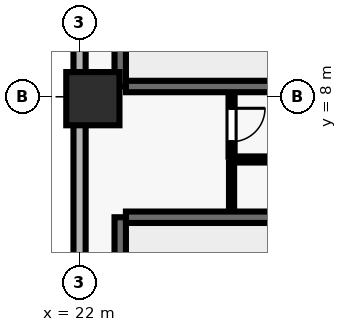
"""IFC4 building model, lengths in metres.
Left out: names, types, materials, properties, quantities, classifications, styles, units other than length and angle.
Written with IfcOpenShell. Run it as: python <this file> out.ifc"""

import sys

from ifc_helpers import new_model, si_unit, direction, frame, frame_2d, origin, origin_2d, place, context, subcontext, project, spatial, rectangle, extrude, element, fill, save


model = new_model("IFC4")
c1 = context("Model", 3, precision=1e-05, world=origin(), true_north=direction((0.0, 1.0)))
c2 = subcontext(c1, "Body", "Model", "MODEL_VIEW")
j1 = project(units=[si_unit("LENGTHUNIT", "METRE"), si_unit("PLANEANGLEUNIT", "RADIAN")], contexts=[c1])
p1 = place(None, origin())
s1 = spatial("IfcSite", under=j1, at=p1, CompositionType="ELEMENT")
p2 = place(p1, origin())
s2 = spatial("IfcBuilding", under=s1, at=p2, CompositionType="ELEMENT")
p3 = place(p2, frame((0.0, 0.0, 77.8)))
s3 = spatial("IfcBuildingStorey", under=s2, at=p3, CompositionType="ELEMENT", Elevation=77.8)
p4 = place(p3, frame((22.35, 7.95, 0.0), z_axis=(0.0, 0.0, 1.0), x_axis=(1.0, 0.0, 0.0)))
e1 = element("IfcColumn", 1, at=p4, inside=s3, PredefinedType="COLUMN", context=c2, shape_type="SweptSolid", body=[
    extrude(rectangle(XDim=1.4, YDim=1.4, at=origin_2d()), origin(), (0.0, 0.0, 1.0), 3.9),
])
p5 = place(p3, frame((22.0, 51.5, 0.0), z_axis=(0.0, 0.0, 1.0), x_axis=(0.0, -1.0, 0.0)))
e2 = element("IfcWall", 2, at=p5, inside=s3, PredefinedType="SOLIDWALL", context=c2, shape_type="SweptSolid", body=[
    extrude(rectangle(XDim=49.0, YDim=0.32, at=frame_2d((24.5, 0.0))), origin(), (0.0, 0.0, 1.0), 3.69),
])
p6 = place(p5, frame((12.1, 0.0, 0.0)))
e3 = element("IfcOpeningElement", 3, at=p6, cuts=e2, PredefinedType="OPENING", context=c2, shape_type="SweptSolid", body=[
    extrude(rectangle(XDim=1.0, YDim=2.2, at=frame_2d((0.5, 1.1))), frame((0.0, 0.17, 0.0), z_axis=(0.0, -1.0, 0.0), x_axis=(1.0, 0.0, 0.0)), (0.0, 0.0, 1.0), 0.34),
])
p7 = place(p5, frame((1.822, 0.0, 0.9)))
e4 = element("IfcOpeningElement", 4, at=p7, cuts=e2, PredefinedType="OPENING", context=c2, shape_type="SweptSolid", body=[
    extrude(rectangle(XDim=1.8, YDim=1.8, at=frame_2d((0.9, 0.9))), frame((0.0, 0.17, 0.0), z_axis=(0.0, -1.0, 0.0), x_axis=(1.0, 0.0, 0.0)), (0.0, 0.0, 1.0), 0.34),
])
p8 = place(p5, frame((7.267, 0.0, 0.9)))
e5 = element("IfcOpeningElement", 5, at=p8, cuts=e2, PredefinedType="OPENING", context=c2, shape_type="SweptSolid", body=[
    extrude(rectangle(XDim=1.8, YDim=1.8, at=frame_2d((0.9, 0.9))), frame((0.0, 0.17, 0.0), z_axis=(0.0, -1.0, 0.0), x_axis=(1.0, 0.0, 0.0)), (0.0, 0.0, 1.0), 0.34),
])
p9 = place(p5, frame((19.056, 0.0, 0.9)))
e6 = element("IfcOpeningElement", 6, at=p9, cuts=e2, PredefinedType="OPENING", context=c2, shape_type="SweptSolid", body=[
    extrude(rectangle(XDim=1.8, YDim=1.8, at=frame_2d((0.9, 0.9))), frame((0.0, 0.17, 0.0), z_axis=(0.0, -1.0, 0.0), x_axis=(1.0, 0.0, 0.0)), (0.0, 0.0, 1.0), 0.34),
])
p10 = place(p5, frame((23.15, 0.0, 0.9)))
e7 = element("IfcOpeningElement", 7, at=p10, cuts=e2, PredefinedType="OPENING", context=c2, shape_type="SweptSolid", body=[
    extrude(rectangle(XDim=1.8, YDim=1.8, at=frame_2d((0.9, 0.9))), frame((0.0, 0.17, 0.0), z_axis=(0.0, -1.0, 0.0), x_axis=(1.0, 0.0, 0.0)), (0.0, 0.0, 1.0), 0.34),
])
p11 = place(p5, frame((29.044, 0.0, 0.9)))
e8 = element("IfcOpeningElement", 8, at=p11, cuts=e2, PredefinedType="OPENING", context=c2, shape_type="SweptSolid", body=[
    extrude(rectangle(XDim=1.8, YDim=1.8, at=frame_2d((0.9, 0.9))), frame((0.0, 0.17, 0.0), z_axis=(0.0, -1.0, 0.0), x_axis=(1.0, 0.0, 0.0)), (0.0, 0.0, 1.0), 0.34),
])
p12 = place(p5, frame((34.039, 0.0, 0.9)))
e9 = element("IfcOpeningElement", 9, at=p12, cuts=e2, PredefinedType="OPENING", context=c2, shape_type="SweptSolid", body=[
    extrude(rectangle(XDim=1.8, YDim=1.8, at=frame_2d((0.9, 0.9))), frame((0.0, 0.17, 0.0), z_axis=(0.0, -1.0, 0.0), x_axis=(1.0, 0.0, 0.0)), (0.0, 0.0, 1.0), 0.34),
])
p13 = place(p5, frame((39.933, 0.0, 0.9)))
e10 = element("IfcOpeningElement", 10, at=p13, cuts=e2, PredefinedType="OPENING", context=c2, shape_type="SweptSolid", body=[
    extrude(rectangle(XDim=1.8, YDim=1.8, at=frame_2d((0.9, 0.9))), frame((0.0, 0.17, 0.0), z_axis=(0.0, -1.0, 0.0), x_axis=(1.0, 0.0, 0.0)), (0.0, 0.0, 1.0), 0.34),
])
p14 = place(p3, frame((31.58, 4.83, 0.0), z_axis=(0.0, 0.0, 1.0), x_axis=(-1.0, 0.0, 0.0)))
e11 = element("IfcWall", 11, at=p14, inside=s3, PredefinedType="SHEAR", context=c2, shape_type="SweptSolid", body=[
    extrude(rectangle(XDim=8.36, YDim=0.3, at=frame_2d((4.18, 0.0))), origin(), (0.0, 0.0, 1.0), 3.69),
])
for number, where, z_axis, x_axis in (
    (12, (23.07, 4.83, 0.0), (0.0, 0.0, 1.0), (0.0, -1.0, 0.0)),
    (13, (23.07, 11.78, 0.0), (0.0, 0.0, 1.0), (0.0, -1.0, 0.0)),
):
    element("IfcWall", number, at=place(p3, frame(where, z_axis=z_axis, x_axis=x_axis)), inside=s3, PredefinedType="SHEAR", context=c2, shape_type="SweptSolid", body=[
        extrude(rectangle(XDim=3.51, YDim=0.3, at=frame_2d((1.755, 0.0))), origin(), (0.0, 0.0, 1.0), 3.69),
    ])
p15 = place(p3, frame((23.22, 8.27, 0.0), z_axis=(0.0, 0.0, 1.0), x_axis=(1.0, 0.0, 0.0)))
e14 = element("IfcWall", 14, at=p15, inside=s3, PredefinedType="SHEAR", context=c2, shape_type="SweptSolid", body=[
    extrude(rectangle(XDim=8.36, YDim=0.3, at=frame_2d((4.18, 0.0))), origin(), (0.0, 0.0, 1.0), 3.69),
])
p16 = place(p3, frame((26.0, 6.35, 0.0), z_axis=(0.0, 0.0, 1.0), x_axis=(1.0, 0.0, 0.0)))
e15 = element("IfcWall", 15, at=p16, inside=s3, PredefinedType="PARTITIONING", context=c2, shape_type="SweptSolid", body=[
    extrude(rectangle(XDim=2.85, YDim=0.16, at=frame_2d((1.425, 0.0))), origin(), (0.0, 0.0, 1.0), 3.69),
])
p17 = place(p16, frame((0.985, 0.0, 0.0)))
e16 = element("IfcOpeningElement", 16, at=p17, cuts=e15, PredefinedType="OPENING", context=c2, shape_type="SweptSolid", body=[
    extrude(rectangle(XDim=0.88, YDim=2.1, at=frame_2d((0.44, 1.05))), frame((0.0, 0.09, 0.0), z_axis=(0.0, -1.0, 0.0), x_axis=(1.0, 0.0, 0.0)), (0.0, 0.0, 1.0), 0.18),
])
p18 = place(p3, frame((26.0, 5.01, 0.0), z_axis=(0.0, 0.0, 1.0), x_axis=(0.0, 1.0, 0.0)))
e17 = element("IfcWall", 17, at=p18, inside=s3, PredefinedType="PARTITIONING", context=c2, shape_type="SweptSolid", body=[
    extrude(rectangle(XDim=1.265, YDim=0.135, at=frame_2d((0.632, 0.0))), origin(), (0.0, 0.0, 1.0), 3.69),
])
p19 = place(p3, frame((26.0, 8.09, 0.0), z_axis=(0.0, 0.0, 1.0), x_axis=(0.0, -1.0, 0.0)))
e18 = element("IfcWall", 18, at=p19, inside=s3, PredefinedType="PARTITIONING", context=c2, shape_type="SweptSolid", body=[
    extrude(rectangle(XDim=1.665, YDim=0.16, at=frame_2d((0.833, 0.0))), origin(), (0.0, 0.0, 1.0), 3.69),
])
p20 = place(p19, frame((0.393, 0.0, 0.0)))
e19 = element("IfcOpeningElement", 19, at=p20, cuts=e18, PredefinedType="OPENING", context=c2, shape_type="SweptSolid", body=[
    extrude(rectangle(XDim=0.88, YDim=2.1, at=frame_2d((0.44, 1.05))), frame((0.0, 0.09, 0.0), z_axis=(0.0, -1.0, 0.0), x_axis=(1.0, 0.0, 0.0)), (0.0, 0.0, 1.0), 0.18),
])
p21 = place(p20, origin())
e20 = element("IfcDoor", 20, at=p21, inside=s3, OperationType="SINGLE_SWING_LEFT", PredefinedType="DOOR", context=c2, shape_type="SweptSolid", body=[
    extrude(rectangle(XDim=0.88, YDim=2.1, at=frame_2d((0.44, 1.05))), frame((0.0, 0.025, 0.0), z_axis=(0.0, -1.0, 0.0), x_axis=(1.0, 0.0, 0.0)), (0.0, 0.0, 1.0), 0.05),
])
fill(e19, e20)
save(model, sys.argv[1])
